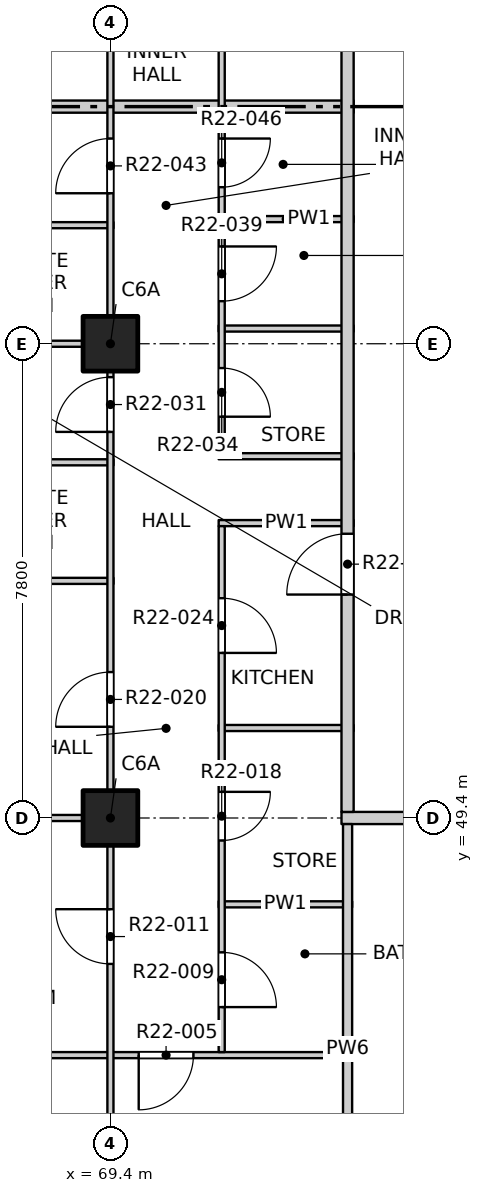
"""IFC4 building model, lengths in metres.
Left out: names, types, materials, properties, quantities, classifications, styles, units other than length and angle.
Written with IfcOpenShell. Run it as: python <this file> out.ifc"""

import sys

from ifc_helpers import new_model, si_unit, direction, frame, frame_2d, origin, origin_2d, place, context, subcontext, project, spatial, rectangle, extrude, element, fill, save


model = new_model("IFC4")
c1 = context("Model", 3, precision=1e-05, world=origin(), true_north=direction((0.0, 1.0)))
c2 = subcontext(c1, "Body", "Model", "MODEL_VIEW")
j1 = project(units=[si_unit("LENGTHUNIT", "METRE"), si_unit("PLANEANGLEUNIT", "RADIAN")], contexts=[c1])
p1 = place(None, origin())
s1 = spatial("IfcSite", under=j1, at=p1, CompositionType="ELEMENT")
p2 = place(p1, origin())
s2 = spatial("IfcBuilding", under=s1, at=p2, CompositionType="ELEMENT")
p3 = place(p2, frame((0.0, 0.0, 224.5)))
s3 = spatial("IfcBuildingStorey", under=s2, at=p3, CompositionType="ELEMENT", Elevation=224.5)
for number, where, z_axis, x_axis in (
    (1, (69.4, 49.4, -0.25), (0.0, 0.0, 1.0), (1.0, 0.0, 0.0)),
    (2, (69.4, 57.2, -0.25), (0.0, 0.0, 1.0), (1.0, 0.0, 0.0)),
):
    element("IfcColumn", number, at=place(p3, frame(where, z_axis=z_axis, x_axis=x_axis)), inside=s3, PredefinedType="COLUMN", context=c2, shape_type="SweptSolid", body=[
        extrude(rectangle(XDim=0.9, YDim=0.9, at=origin_2d()), origin(), (0.0, 0.0, 1.0), 3.4),
    ])
p4 = place(p3, frame((61.9, 45.5, 0.0), z_axis=(0.0, 0.0, 1.0), x_axis=(1.0, 0.0, 0.0)))
e3 = element("IfcWall", 3, at=p4, inside=s3, PredefinedType="PARTITIONING", context=c2, shape_type="SweptSolid", body=[
    extrude(rectangle(XDim=11.475, YDim=0.1, at=frame_2d((5.737, 0.0))), origin(), (0.0, 0.0, 1.0), 3.15),
])
p5 = place(p4, frame((7.965, 0.0, 0.0)))
e4 = element("IfcOpeningElement", 4, at=p5, cuts=e3, PredefinedType="OPENING", context=c2, shape_type="SweptSolid", body=[
    extrude(rectangle(XDim=0.9, YDim=2.1, at=frame_2d((0.45, 1.05))), frame((0.0, 0.06, 0.0), z_axis=(0.0, -1.0, 0.0), x_axis=(1.0, 0.0, 0.0)), (0.0, 0.0, 1.0), 0.12),
])
p6 = place(p3, frame((71.18, 47.98, 0.0), z_axis=(0.0, 0.0, 1.0), x_axis=(1.0, 0.0, 0.0)))
e5 = element("IfcWall", 5, at=p6, inside=s3, PredefinedType="PARTITIONING", context=c2, shape_type="SweptSolid", body=[
    extrude(rectangle(XDim=2.195, YDim=0.1, at=frame_2d((1.097, 0.0))), origin(), (0.0, 0.0, 1.0), 3.15),
])
p7 = place(p3, frame((61.9, 49.4, 0.0), z_axis=(0.0, 0.0, 1.0), x_axis=(1.0, 0.0, 0.0)))
e6 = element("IfcWall", 6, at=p7, inside=s3, PredefinedType="PARTITIONING", context=c2, shape_type="SweptSolid", body=[
    extrude(rectangle(XDim=7.55, YDim=0.1, at=frame_2d((3.775, 0.0))), origin(), (0.0, 0.0, 1.0), 3.15),
])
p8 = place(p3, frame((73.2, 49.4, 0.0), z_axis=(0.0, 0.0, 1.0), x_axis=(1.0, 0.0, 0.0)))
e7 = element("IfcWall", 7, at=p8, inside=s3, PredefinedType="PARTITIONING", context=c2, shape_type="SweptSolid", body=[
    extrude(rectangle(XDim=23.6, YDim=0.2, at=frame_2d((11.8, 0.0))), origin(), (0.0, 0.0, 1.0), 3.15),
])
p9 = place(p8, frame((5.35, 0.0, 0.0)))
e8 = element("IfcOpeningElement", 8, at=p9, cuts=e7, PredefinedType="OPENING", context=c2, shape_type="SweptSolid", body=[
    extrude(rectangle(XDim=1.2, YDim=2.1, at=frame_2d((0.6, 1.05))), frame((0.0, 0.11, 0.0), z_axis=(0.0, -1.0, 0.0), x_axis=(1.0, 0.0, 0.0)), (0.0, 0.0, 1.0), 0.22),
])
p10 = place(p8, frame((15.1, 0.0, 0.0)))
e9 = element("IfcOpeningElement", 9, at=p10, cuts=e7, PredefinedType="OPENING", context=c2, shape_type="SweptSolid", body=[
    extrude(rectangle(XDim=1.2, YDim=2.1, at=frame_2d((0.6, 1.05))), frame((0.0, 0.11, 0.0), z_axis=(0.0, -1.0, 0.0), x_axis=(1.0, 0.0, 0.0)), (0.0, 0.0, 1.0), 0.22),
])
p11 = place(p8, frame((21.1, 0.0, 0.0)))
e10 = element("IfcOpeningElement", 10, at=p11, cuts=e7, PredefinedType="OPENING", context=c2, shape_type="SweptSolid", body=[
    extrude(rectangle(XDim=0.9, YDim=2.1, at=frame_2d((0.45, 1.05))), frame((0.0, 0.11, 0.0), z_axis=(0.0, -1.0, 0.0), x_axis=(1.0, 0.0, 0.0)), (0.0, 0.0, 1.0), 0.22),
])
p12 = place(p3, frame((71.18, 50.88, 0.0), z_axis=(0.0, 0.0, 1.0), x_axis=(1.0, 0.0, 0.0)))
e11 = element("IfcWall", 11, at=p12, inside=s3, PredefinedType="PARTITIONING", context=c2, shape_type="SweptSolid", body=[
    extrude(rectangle(XDim=2.22, YDim=0.1, at=frame_2d((1.11, 0.0))), origin(), (0.0, 0.0, 1.0), 3.15),
])
p13 = place(p3, frame((61.9, 53.3, 0.0), z_axis=(0.0, 0.0, 1.0), x_axis=(1.0, 0.0, 0.0)))
e12 = element("IfcWall", 12, at=p13, inside=s3, PredefinedType="PARTITIONING", context=c2, shape_type="SweptSolid", body=[
    extrude(rectangle(XDim=7.55, YDim=0.1, at=frame_2d((3.775, 0.0))), origin(), (0.0, 0.0, 1.0), 3.15),
])
p14 = place(p3, frame((71.18, 54.25, 0.0), z_axis=(0.0, 0.0, 1.0), x_axis=(1.0, 0.0, 0.0)))
e13 = element("IfcWall", 13, at=p14, inside=s3, PredefinedType="PARTITIONING", context=c2, shape_type="SweptSolid", body=[
    extrude(rectangle(XDim=2.22, YDim=0.1, at=frame_2d((1.11, 0.0))), origin(), (0.0, 0.0, 1.0), 3.15),
])
p15 = place(p3, frame((65.9, 55.25, 0.0), z_axis=(0.0, 0.0, 1.0), x_axis=(1.0, 0.0, 0.0)))
e14 = element("IfcWall", 14, at=p15, inside=s3, PredefinedType="PARTITIONING", context=c2, shape_type="SweptSolid", body=[
    extrude(rectangle(XDim=3.55, YDim=0.1, at=frame_2d((1.775, 0.0))), origin(), (0.0, 0.0, 1.0), 3.15),
])
p16 = place(p3, frame((71.18, 55.35, 0.0), z_axis=(0.0, 0.0, 1.0), x_axis=(1.0, 0.0, 0.0)))
e15 = element("IfcWall", 15, at=p16, inside=s3, PredefinedType="PARTITIONING", context=c2, shape_type="SweptSolid", body=[
    extrude(rectangle(XDim=2.22, YDim=0.1, at=frame_2d((1.11, 0.0))), origin(), (0.0, 0.0, 1.0), 3.15),
])
p17 = place(p3, frame((61.9, 57.2, 0.0), z_axis=(0.0, 0.0, 1.0), x_axis=(1.0, 0.0, 0.0)))
e16 = element("IfcWall", 16, at=p17, inside=s3, PredefinedType="PARTITIONING", context=c2, shape_type="SweptSolid", body=[
    extrude(rectangle(XDim=7.55, YDim=0.1, at=frame_2d((3.775, 0.0))), origin(), (0.0, 0.0, 1.0), 3.15),
])
p18 = place(p3, frame((71.18, 57.45, 0.0), z_axis=(0.0, 0.0, 1.0), x_axis=(1.0, 0.0, 0.0)))
e17 = element("IfcWall", 17, at=p18, inside=s3, PredefinedType="PARTITIONING", context=c2, shape_type="SweptSolid", body=[
    extrude(rectangle(XDim=2.22, YDim=0.1, at=frame_2d((1.11, 0.0))), origin(), (0.0, 0.0, 1.0), 3.15),
])
p19 = place(p3, frame((65.9, 59.15, 0.0), z_axis=(0.0, 0.0, 1.0), x_axis=(1.0, 0.0, 0.0)))
e18 = element("IfcWall", 18, at=p19, inside=s3, PredefinedType="PARTITIONING", context=c2, shape_type="SweptSolid", body=[
    extrude(rectangle(XDim=3.55, YDim=0.1, at=frame_2d((1.775, 0.0))), origin(), (0.0, 0.0, 1.0), 3.15),
])
p20 = place(p3, frame((71.18, 59.25, 0.0), z_axis=(0.0, 0.0, 1.0), x_axis=(1.0, 0.0, 0.0)))
e19 = element("IfcWall", 19, at=p20, inside=s3, PredefinedType="PARTITIONING", context=c2, shape_type="SweptSolid", body=[
    extrude(rectangle(XDim=2.22, YDim=0.1, at=frame_2d((1.11, 0.0))), origin(), (0.0, 0.0, 1.0), 3.15),
])
p21 = place(p3, frame((61.9, 61.1, 0.0), z_axis=(0.0, 0.0, 1.0), x_axis=(1.0, 0.0, 0.0)))
e20 = element("IfcWall", 20, at=p21, inside=s3, PredefinedType="PARTITIONING", context=c2, shape_type="SweptSolid", body=[
    extrude(rectangle(XDim=11.5, YDim=0.2, at=frame_2d((5.75, 0.0))), origin(), (0.0, 0.0, 1.0), 2.55),
])
p22 = place(p3, frame((69.4, 41.9, 0.0), z_axis=(0.0, 0.0, 1.0), x_axis=(0.0, 1.0, 0.0)))
e21 = element("IfcWall", 21, at=p22, inside=s3, PredefinedType="PARTITIONING", context=c2, shape_type="SweptSolid", body=[
    extrude(rectangle(XDim=46.2, YDim=0.1, at=frame_2d((23.1, 0.0))), origin(), (0.0, 0.0, 1.0), 3.15),
])
p23 = place(p22, frame((1.2, 0.0, 0.0)))
e22 = element("IfcOpeningElement", 22, at=p23, cuts=e21, PredefinedType="OPENING", context=c2, shape_type="SweptSolid", body=[
    extrude(rectangle(XDim=0.9, YDim=2.1, at=frame_2d((0.45, 1.05))), frame((0.0, 0.06, 0.0), z_axis=(0.0, -1.0, 0.0), x_axis=(1.0, 0.0, 0.0)), (0.0, 0.0, 1.0), 0.12),
])
p24 = place(p22, frame((5.1, 0.0, 0.0)))
e23 = element("IfcOpeningElement", 23, at=p24, cuts=e21, PredefinedType="OPENING", context=c2, shape_type="SweptSolid", body=[
    extrude(rectangle(XDim=0.9, YDim=2.1, at=frame_2d((0.45, 1.05))), frame((0.0, 0.06, 0.0), z_axis=(0.0, -1.0, 0.0), x_axis=(1.0, 0.0, 0.0)), (0.0, 0.0, 1.0), 0.12),
])
p25 = place(p22, frame((9.0, 0.0, 0.0)))
e24 = element("IfcOpeningElement", 24, at=p25, cuts=e21, PredefinedType="OPENING", context=c2, shape_type="SweptSolid", body=[
    extrude(rectangle(XDim=0.9, YDim=2.1, at=frame_2d((0.45, 1.05))), frame((0.0, 0.06, 0.0), z_axis=(0.0, -1.0, 0.0), x_axis=(1.0, 0.0, 0.0)), (0.0, 0.0, 1.0), 0.12),
])
p26 = place(p22, frame((13.85, 0.0, 0.0)))
e25 = element("IfcOpeningElement", 25, at=p26, cuts=e21, PredefinedType="OPENING", context=c2, shape_type="SweptSolid", body=[
    extrude(rectangle(XDim=0.9, YDim=2.1, at=frame_2d((0.45, 1.05))), frame((0.0, 0.06, 0.0), z_axis=(0.0, -1.0, 0.0), x_axis=(1.0, 0.0, 0.0)), (0.0, 0.0, 1.0), 0.12),
])
p27 = place(p22, frame((17.775, 0.0, 0.0)))
e26 = element("IfcOpeningElement", 26, at=p27, cuts=e21, PredefinedType="OPENING", context=c2, shape_type="SweptSolid", body=[
    extrude(rectangle(XDim=0.9, YDim=2.1, at=frame_2d((0.45, 1.05))), frame((0.0, 0.06, 0.0), z_axis=(0.0, -1.0, 0.0), x_axis=(1.0, 0.0, 0.0)), (0.0, 0.0, 1.0), 0.12),
])
p28 = place(p22, frame((21.625, 0.0, 0.0)))
e27 = element("IfcOpeningElement", 27, at=p28, cuts=e21, PredefinedType="OPENING", context=c2, shape_type="SweptSolid", body=[
    extrude(rectangle(XDim=0.9, YDim=2.1, at=frame_2d((0.45, 1.05))), frame((0.0, 0.06, 0.0), z_axis=(0.0, -1.0, 0.0), x_axis=(1.0, 0.0, 0.0)), (0.0, 0.0, 1.0), 0.12),
])
p29 = place(p22, frame((24.6, 0.0, 0.0)))
e28 = element("IfcOpeningElement", 28, at=p29, cuts=e21, PredefinedType="OPENING", context=c2, shape_type="SweptSolid", body=[
    extrude(rectangle(XDim=0.9, YDim=2.1, at=frame_2d((0.45, 1.05))), frame((0.0, 0.06, 0.0), z_axis=(0.0, -1.0, 0.0), x_axis=(1.0, 0.0, 0.0)), (0.0, 0.0, 1.0), 0.12),
])
p30 = place(p22, frame((29.425, 0.0, 0.0)))
e29 = element("IfcOpeningElement", 29, at=p30, cuts=e21, PredefinedType="OPENING", context=c2, shape_type="SweptSolid", body=[
    extrude(rectangle(XDim=0.9, YDim=2.1, at=frame_2d((0.45, 1.05))), frame((0.0, 0.06, 0.0), z_axis=(0.0, -1.0, 0.0), x_axis=(1.0, 0.0, 0.0)), (0.0, 0.0, 1.0), 0.12),
])
p31 = place(p22, frame((33.375, 0.0, 0.0)))
e30 = element("IfcOpeningElement", 30, at=p31, cuts=e21, PredefinedType="OPENING", context=c2, shape_type="SweptSolid", body=[
    extrude(rectangle(XDim=0.9, YDim=2.1, at=frame_2d((0.45, 1.05))), frame((0.0, 0.06, 0.0), z_axis=(0.0, -1.0, 0.0), x_axis=(1.0, 0.0, 0.0)), (0.0, 0.0, 1.0), 0.12),
])
p32 = place(p22, frame((36.3, 0.0, 0.0)))
e31 = element("IfcOpeningElement", 31, at=p32, cuts=e21, PredefinedType="OPENING", context=c2, shape_type="SweptSolid", body=[
    extrude(rectangle(XDim=0.9, YDim=2.1, at=frame_2d((0.45, 1.05))), frame((0.0, 0.06, 0.0), z_axis=(0.0, -1.0, 0.0), x_axis=(1.0, 0.0, 0.0)), (0.0, 0.0, 1.0), 0.12),
])
p33 = place(p22, frame((41.175, 0.0, 0.0)))
e32 = element("IfcOpeningElement", 32, at=p33, cuts=e21, PredefinedType="OPENING", context=c2, shape_type="SweptSolid", body=[
    extrude(rectangle(XDim=0.9, YDim=2.1, at=frame_2d((0.45, 1.05))), frame((0.0, 0.06, 0.0), z_axis=(0.0, -1.0, 0.0), x_axis=(1.0, 0.0, 0.0)), (0.0, 0.0, 1.0), 0.12),
])
p34 = place(p22, frame((44.1, 0.0, 0.0)))
e33 = element("IfcOpeningElement", 33, at=p34, cuts=e21, PredefinedType="OPENING", context=c2, shape_type="SweptSolid", body=[
    extrude(rectangle(XDim=0.9, YDim=2.1, at=frame_2d((0.45, 1.05))), frame((0.0, 0.06, 0.0), z_axis=(0.0, -1.0, 0.0), x_axis=(1.0, 0.0, 0.0)), (0.0, 0.0, 1.0), 0.12),
])
p35 = place(p3, frame((71.23, 45.55, 0.0), z_axis=(0.0, 0.0, 1.0), x_axis=(0.0, 1.0, 0.0)))
e34 = element("IfcWall", 34, at=p35, inside=s3, PredefinedType="PARTITIONING", context=c2, shape_type="SweptSolid", body=[
    extrude(rectangle(XDim=8.65, YDim=0.1, at=frame_2d((4.325, 0.0))), origin(), (0.0, 0.0, 1.0), 3.15),
])
p36 = place(p35, frame((0.74, 0.0, 0.0)))
e35 = element("IfcOpeningElement", 35, at=p36, cuts=e34, PredefinedType="OPENING", context=c2, shape_type="SweptSolid", body=[
    extrude(rectangle(XDim=0.9, YDim=2.1, at=frame_2d((0.45, 1.05))), frame((0.0, 0.06, 0.0), z_axis=(0.0, -1.0, 0.0), x_axis=(1.0, 0.0, 0.0)), (0.0, 0.0, 1.0), 0.12),
])
p37 = place(p35, frame((3.48, 0.0, 0.0)))
e36 = element("IfcOpeningElement", 36, at=p37, cuts=e34, PredefinedType="OPENING", context=c2, shape_type="SweptSolid", body=[
    extrude(rectangle(XDim=0.8, YDim=2.1, at=frame_2d((0.4, 1.05))), frame((0.0, 0.06, 0.0), z_axis=(0.0, -1.0, 0.0), x_axis=(1.0, 0.0, 0.0)), (0.0, 0.0, 1.0), 0.12),
])
p38 = place(p35, frame((6.565, 0.0, 0.0)))
e37 = element("IfcOpeningElement", 37, at=p38, cuts=e34, PredefinedType="OPENING", context=c2, shape_type="SweptSolid", body=[
    extrude(rectangle(XDim=0.9, YDim=2.1, at=frame_2d((0.45, 1.05))), frame((0.0, 0.06, 0.0), z_axis=(0.0, -1.0, 0.0), x_axis=(1.0, 0.0, 0.0)), (0.0, 0.0, 1.0), 0.12),
])
p39 = place(p3, frame((71.23, 55.4, 0.0), z_axis=(0.0, 0.0, 1.0), x_axis=(0.0, 1.0, 0.0)))
e38 = element("IfcWall", 38, at=p39, inside=s3, PredefinedType="PARTITIONING", context=c2, shape_type="SweptSolid", body=[
    extrude(rectangle(XDim=10.85, YDim=0.1, at=frame_2d((5.425, 0.0))), origin(), (0.0, 0.0, 1.0), 3.15),
])
p40 = place(p39, frame((0.6, 0.0, 0.0)))
e39 = element("IfcOpeningElement", 39, at=p40, cuts=e38, PredefinedType="OPENING", context=c2, shape_type="SweptSolid", body=[
    extrude(rectangle(XDim=0.8, YDim=2.1, at=frame_2d((0.4, 1.05))), frame((0.0, 0.06, 0.0), z_axis=(0.0, -1.0, 0.0), x_axis=(1.0, 0.0, 0.0)), (0.0, 0.0, 1.0), 0.12),
])
p41 = place(p39, frame((2.5, 0.0, 0.0)))
e40 = element("IfcOpeningElement", 40, at=p41, cuts=e38, PredefinedType="OPENING", context=c2, shape_type="SweptSolid", body=[
    extrude(rectangle(XDim=0.9, YDim=2.1, at=frame_2d((0.45, 1.05))), frame((0.0, 0.06, 0.0), z_axis=(0.0, -1.0, 0.0), x_axis=(1.0, 0.0, 0.0)), (0.0, 0.0, 1.0), 0.12),
])
p42 = place(p39, frame((4.375, 0.0, 0.0)))
e41 = element("IfcOpeningElement", 41, at=p42, cuts=e38, PredefinedType="OPENING", context=c2, shape_type="SweptSolid", body=[
    extrude(rectangle(XDim=0.8, YDim=2.1, at=frame_2d((0.4, 1.05))), frame((0.0, 0.06, 0.0), z_axis=(0.0, -1.0, 0.0), x_axis=(1.0, 0.0, 0.0)), (0.0, 0.0, 1.0), 0.12),
])
p43 = place(p39, frame((6.935, 0.0, 0.0)))
e42 = element("IfcOpeningElement", 42, at=p43, cuts=e38, PredefinedType="OPENING", context=c2, shape_type="SweptSolid", body=[
    extrude(rectangle(XDim=0.9, YDim=2.1, at=frame_2d((0.45, 1.05))), frame((0.0, 0.06, 0.0), z_axis=(0.0, -1.0, 0.0), x_axis=(1.0, 0.0, 0.0)), (0.0, 0.0, 1.0), 0.12),
])
p44 = place(p39, frame((9.535, 0.0, 0.0)))
e43 = element("IfcOpeningElement", 43, at=p44, cuts=e38, PredefinedType="OPENING", context=c2, shape_type="SweptSolid", body=[
    extrude(rectangle(XDim=0.9, YDim=2.1, at=frame_2d((0.45, 1.05))), frame((0.0, 0.06, 0.0), z_axis=(0.0, -1.0, 0.0), x_axis=(1.0, 0.0, 0.0)), (0.0, 0.0, 1.0), 0.12),
])
p45 = place(p3, frame((73.3, 41.9, 0.0), z_axis=(0.0, 0.0, 1.0), x_axis=(0.0, 1.0, 0.0)))
e44 = element("IfcWall", 44, at=p45, inside=s3, PredefinedType="PARTITIONING", context=c2, shape_type="SweptSolid", body=[
    extrude(rectangle(XDim=7.4, YDim=0.15, at=frame_2d((3.7, 0.0))), origin(), (0.0, 0.0, 1.0), 3.15),
])
p46 = place(p3, frame((73.3, 49.5, 0.0), z_axis=(0.0, 0.0, 1.0), x_axis=(0.0, 1.0, 0.0)))
e45 = element("IfcWall", 45, at=p46, inside=s3, PredefinedType="PARTITIONING", context=c2, shape_type="SweptSolid", body=[
    extrude(rectangle(XDim=34.9, YDim=0.2, at=frame_2d((17.45, 0.0))), origin(), (0.0, 0.0, 1.0), 3.15),
])
p47 = place(p46, frame((3.575, 0.0, 0.0)))
e46 = element("IfcOpeningElement", 46, at=p47, cuts=e45, PredefinedType="OPENING", context=c2, shape_type="SweptSolid", body=[
    extrude(rectangle(XDim=1.0, YDim=2.1, at=frame_2d((0.5, 1.05))), frame((0.0, 0.11, 0.0), z_axis=(0.0, -1.0, 0.0), x_axis=(1.0, 0.0, 0.0)), (0.0, 0.0, 1.0), 0.22),
])
p48 = place(p46, frame((18.075, 0.0, 0.0)))
e47 = element("IfcOpeningElement", 47, at=p48, cuts=e45, PredefinedType="OPENING", context=c2, shape_type="SweptSolid", body=[
    extrude(rectangle(XDim=1.0, YDim=2.1, at=frame_2d((0.5, 1.05))), frame((0.0, 0.11, 0.0), z_axis=(0.0, -1.0, 0.0), x_axis=(1.0, 0.0, 0.0)), (0.0, 0.0, 1.0), 0.22),
])
p49 = place(p46, frame((26.175, 0.0, 0.0)))
e48 = element("IfcOpeningElement", 48, at=p49, cuts=e45, PredefinedType="OPENING", context=c2, shape_type="SweptSolid", body=[
    extrude(rectangle(XDim=1.0, YDim=2.1, at=frame_2d((0.5, 1.05))), frame((0.0, 0.11, 0.0), z_axis=(0.0, -1.0, 0.0), x_axis=(1.0, 0.0, 0.0)), (0.0, 0.0, 1.0), 0.22),
])
p50 = place(p5, origin())
e49 = element("IfcDoor", 49, at=p50, inside=s3, OperationType="SINGLE_SWING_RIGHT", PredefinedType="DOOR", context=c2, shape_type="SweptSolid", body=[
    extrude(rectangle(XDim=0.9, YDim=2.1, at=frame_2d((0.45, 1.05))), frame((0.0, 0.025, 0.0), z_axis=(0.0, -1.0, 0.0), x_axis=(1.0, 0.0, 0.0)), (0.0, 0.0, 1.0), 0.05),
])
fill(e4, e49)
p51 = place(p36, origin())
e50 = element("IfcDoor", 50, at=p51, inside=s3, OperationType="SINGLE_SWING_RIGHT", PredefinedType="DOOR", context=c2, shape_type="SweptSolid", body=[
    extrude(rectangle(XDim=0.9, YDim=2.1, at=frame_2d((0.45, 1.05))), frame((0.0, 0.025, 0.0), z_axis=(0.0, -1.0, 0.0), x_axis=(1.0, 0.0, 0.0)), (0.0, 0.0, 1.0), 0.05),
])
fill(e35, e50)
p52 = place(p24, origin())
e51 = element("IfcDoor", 51, at=p52, inside=s3, OperationType="SINGLE_SWING_RIGHT", PredefinedType="DOOR", context=c2, shape_type="SweptSolid", body=[
    extrude(rectangle(XDim=0.9, YDim=2.1, at=frame_2d((0.45, 1.05))), frame((0.0, 0.025, 0.0), z_axis=(0.0, -1.0, 0.0), x_axis=(1.0, 0.0, 0.0)), (0.0, 0.0, 1.0), 0.05),
])
fill(e23, e51)
p53 = place(p37, origin())
e52 = element("IfcDoor", 52, at=p53, inside=s3, OperationType="SINGLE_SWING_LEFT", PredefinedType="DOOR", context=c2, shape_type="SweptSolid", body=[
    extrude(rectangle(XDim=0.8, YDim=2.1, at=frame_2d((0.4, 1.05))), frame((0.0, 0.025, 0.0), z_axis=(0.0, -1.0, 0.0), x_axis=(1.0, 0.0, 0.0)), (0.0, 0.0, 1.0), 0.05),
])
fill(e36, e52)
p54 = place(p25, origin())
e53 = element("IfcDoor", 53, at=p54, inside=s3, OperationType="SINGLE_SWING_LEFT", PredefinedType="DOOR", context=c2, shape_type="SweptSolid", body=[
    extrude(rectangle(XDim=0.9, YDim=2.1, at=frame_2d((0.45, 1.05))), frame((0.0, 0.025, 0.0), z_axis=(0.0, -1.0, 0.0), x_axis=(1.0, 0.0, 0.0)), (0.0, 0.0, 1.0), 0.05),
])
fill(e24, e53)
p55 = place(p38, origin())
e54 = element("IfcDoor", 54, at=p55, inside=s3, OperationType="SINGLE_SWING_RIGHT", PredefinedType="DOOR", context=c2, shape_type="SweptSolid", body=[
    extrude(rectangle(XDim=0.9, YDim=2.1, at=frame_2d((0.45, 1.05))), frame((0.0, 0.025, 0.0), z_axis=(0.0, -1.0, 0.0), x_axis=(1.0, 0.0, 0.0)), (0.0, 0.0, 1.0), 0.05),
])
fill(e37, e54)
p56 = place(p47, origin())
e55 = element("IfcDoor", 55, at=p56, inside=s3, OperationType="SINGLE_SWING_LEFT", PredefinedType="DOOR", context=c2, shape_type="SweptSolid", body=[
    extrude(rectangle(XDim=1.0, YDim=2.1, at=frame_2d((0.5, 1.05))), frame((0.0, 0.025, 0.0), z_axis=(0.0, -1.0, 0.0), x_axis=(1.0, 0.0, 0.0)), (0.0, 0.0, 1.0), 0.05),
])
fill(e46, e55)
p57 = place(p26, origin())
e56 = element("IfcDoor", 56, at=p57, inside=s3, OperationType="SINGLE_SWING_LEFT", PredefinedType="DOOR", context=c2, shape_type="SweptSolid", body=[
    extrude(rectangle(XDim=0.9, YDim=2.1, at=frame_2d((0.45, 1.05))), frame((0.0, 0.025, 0.0), z_axis=(0.0, -1.0, 0.0), x_axis=(1.0, 0.0, 0.0)), (0.0, 0.0, 1.0), 0.05),
])
fill(e25, e56)
p58 = place(p40, origin())
e57 = element("IfcDoor", 57, at=p58, inside=s3, OperationType="SINGLE_SWING_RIGHT", PredefinedType="DOOR", context=c2, shape_type="SweptSolid", body=[
    extrude(rectangle(XDim=0.8, YDim=2.1, at=frame_2d((0.4, 1.05))), frame((0.0, 0.025, 0.0), z_axis=(0.0, -1.0, 0.0), x_axis=(1.0, 0.0, 0.0)), (0.0, 0.0, 1.0), 0.05),
])
fill(e39, e57)
p59 = place(p41, origin())
e58 = element("IfcDoor", 58, at=p59, inside=s3, OperationType="SINGLE_SWING_LEFT", PredefinedType="DOOR", context=c2, shape_type="SweptSolid", body=[
    extrude(rectangle(XDim=0.9, YDim=2.1, at=frame_2d((0.45, 1.05))), frame((0.0, 0.025, 0.0), z_axis=(0.0, -1.0, 0.0), x_axis=(1.0, 0.0, 0.0)), (0.0, 0.0, 1.0), 0.05),
])
fill(e40, e58)
p60 = place(p27, origin())
e59 = element("IfcDoor", 59, at=p60, inside=s3, OperationType="SINGLE_SWING_LEFT", PredefinedType="DOOR", context=c2, shape_type="SweptSolid", body=[
    extrude(rectangle(XDim=0.9, YDim=2.1, at=frame_2d((0.45, 1.05))), frame((0.0, 0.025, 0.0), z_axis=(0.0, -1.0, 0.0), x_axis=(1.0, 0.0, 0.0)), (0.0, 0.0, 1.0), 0.05),
])
fill(e26, e59)
p61 = place(p42, origin())
e60 = element("IfcDoor", 60, at=p61, inside=s3, OperationType="SINGLE_SWING_LEFT", PredefinedType="DOOR", context=c2, shape_type="SweptSolid", body=[
    extrude(rectangle(XDim=0.8, YDim=2.1, at=frame_2d((0.4, 1.05))), frame((0.0, 0.025, 0.0), z_axis=(0.0, -1.0, 0.0), x_axis=(1.0, 0.0, 0.0)), (0.0, 0.0, 1.0), 0.05),
])
fill(e41, e60)
save(model, sys.argv[1])
